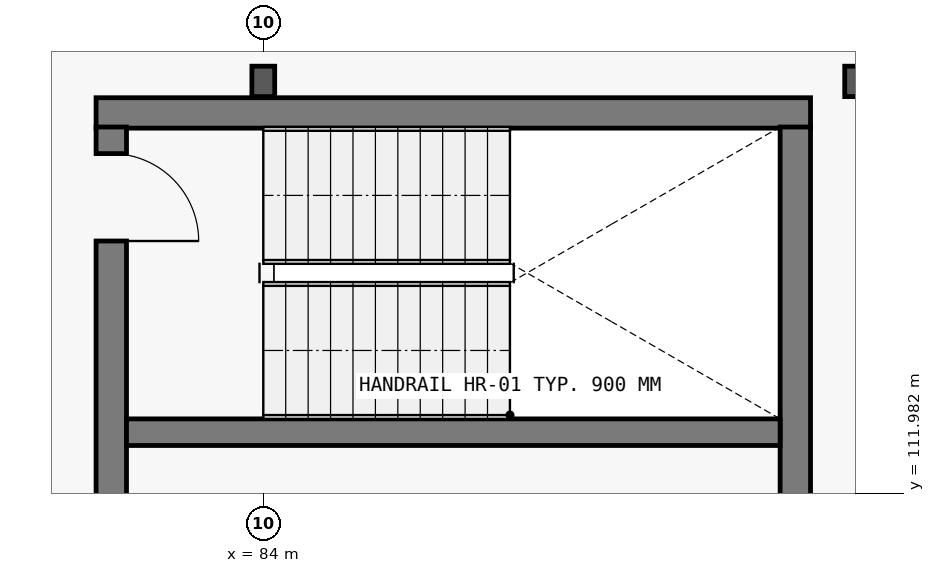
"""IFC4 building model, lengths in metres.
Left out: names, types, materials, properties, quantities, classifications, styles, units other than length and angle.
Written with IfcOpenShell. Run it as: python <this file> out.ifc"""

import sys

from ifc_helpers import new_model, si_unit, direction, frame, frame_2d, origin, origin_2d, place, context, subcontext, project, spatial, rectangle, i_section, extrude, element, fill, save


model = new_model("IFC4")
c1 = context("Model", 3, precision=1e-05, world=origin(), true_north=direction((0.0, 1.0)))
c2 = subcontext(c1, "Body", "Model", "MODEL_VIEW")
j1 = project(units=[si_unit("LENGTHUNIT", "METRE"), si_unit("PLANEANGLEUNIT", "RADIAN")], contexts=[c1])
p1 = place(None, origin())
s1 = spatial("IfcSite", under=j1, at=p1, CompositionType="ELEMENT")
p2 = place(p1, origin())
s2 = spatial("IfcBuilding", under=s1, at=p2, CompositionType="ELEMENT")
p3 = place(p2, frame((0.0, 0.0, 10.8)))
s3 = spatial("IfcBuildingStorey", under=s2, at=p3, CompositionType="ELEMENT", Elevation=10.8)
for number, where, z_axis, x_axis in (
    (1, (84.0, 117.4, 0.0), (0.0, 0.0, 1.0), (1.0, 0.0, 0.0)),
    (2, (91.8, 117.4, 0.0), (0.0, 0.0, 1.0), (1.0, 0.0, 0.0)),
):
    element("IfcColumn", number, at=place(p3, frame(where, z_axis=z_axis, x_axis=x_axis)), inside=s3, PredefinedType="COLUMN", context=c2, shape_type="SweptSolid", body=[
        extrude(i_section(OverallWidth=0.3, OverallDepth=0.4, WebThickness=0.013, FlangeThickness=0.024, at=origin_2d()), origin(), (0.0, 0.0, 1.0), 4.2),
    ])
p4 = place(p3, frame((91.2, 116.985, 0.0), z_axis=(0.0, 0.0, 1.0), x_axis=(-1.0, 0.0, 0.0)))
e3 = element("IfcWall", 3, at=p4, inside=s3, PredefinedType="SHEAR", context=c2, shape_type="SweptSolid", body=[
    extrude(rectangle(XDim=9.4, YDim=0.4, at=frame_2d((4.7, 0.0))), origin(), (0.0, 0.0, 1.0), 3.92),
])
p5 = place(p3, frame((82.0, 116.8, 0.0), z_axis=(0.0, 0.0, 1.0), x_axis=(0.0, -1.0, 0.0)))
e4 = element("IfcWall", 4, at=p5, inside=s3, PredefinedType="SHEAR", context=c2, shape_type="SweptSolid", body=[
    extrude(rectangle(XDim=7.2, YDim=0.4, at=frame_2d((3.6, 0.0))), origin(), (0.0, 0.0, 1.0), 3.92),
])
p6 = place(p5, frame((0.35, 0.0, 0.0)))
e5 = element("IfcOpeningElement", 5, at=p6, cuts=e4, PredefinedType="OPENING", context=c2, shape_type="SweptSolid", body=[
    extrude(rectangle(XDim=1.15, YDim=2.2, at=frame_2d((0.575, 1.1))), frame((0.0, 0.21, 0.0), z_axis=(0.0, -1.0, 0.0), x_axis=(1.0, 0.0, 0.0)), (0.0, 0.0, 1.0), 0.42),
])
p7 = place(p3, frame((91.0, 109.6, 0.0), z_axis=(0.0, 0.0, 1.0), x_axis=(0.0, 1.0, 0.0)))
e6 = element("IfcWall", 6, at=p7, inside=s3, PredefinedType="SHEAR", context=c2, shape_type="SweptSolid", body=[
    extrude(rectangle(XDim=7.2, YDim=0.4, at=frame_2d((3.6, 0.0))), origin(), (0.0, 0.0, 1.0), 3.92),
])
p8 = place(p3, frame((82.2, 112.785, 0.0), z_axis=(0.0, 0.0, 1.0), x_axis=(1.0, 0.0, 0.0)))
e7 = element("IfcWall", 7, at=p8, inside=s3, PredefinedType="SHEAR", context=c2, shape_type="SweptSolid", body=[
    extrude(rectangle(XDim=8.6, YDim=0.35, at=frame_2d((4.3, 0.0))), origin(), (0.0, 0.0, 1.0), 3.92),
])
p9 = place(p6, origin())
e8 = element("IfcDoor", 8, at=p9, inside=s3, OperationType="SINGLE_SWING_RIGHT", PredefinedType="DOOR", context=c2, shape_type="SweptSolid", body=[
    extrude(rectangle(XDim=1.15, YDim=2.2, at=frame_2d((0.575, 1.1))), frame((0.0, 0.025, 0.0), z_axis=(0.0, -1.0, 0.0), x_axis=(1.0, 0.0, 0.0)), (0.0, 0.0, 1.0), 0.05),
])
fill(e5, e8)
save(model, sys.argv[1])
